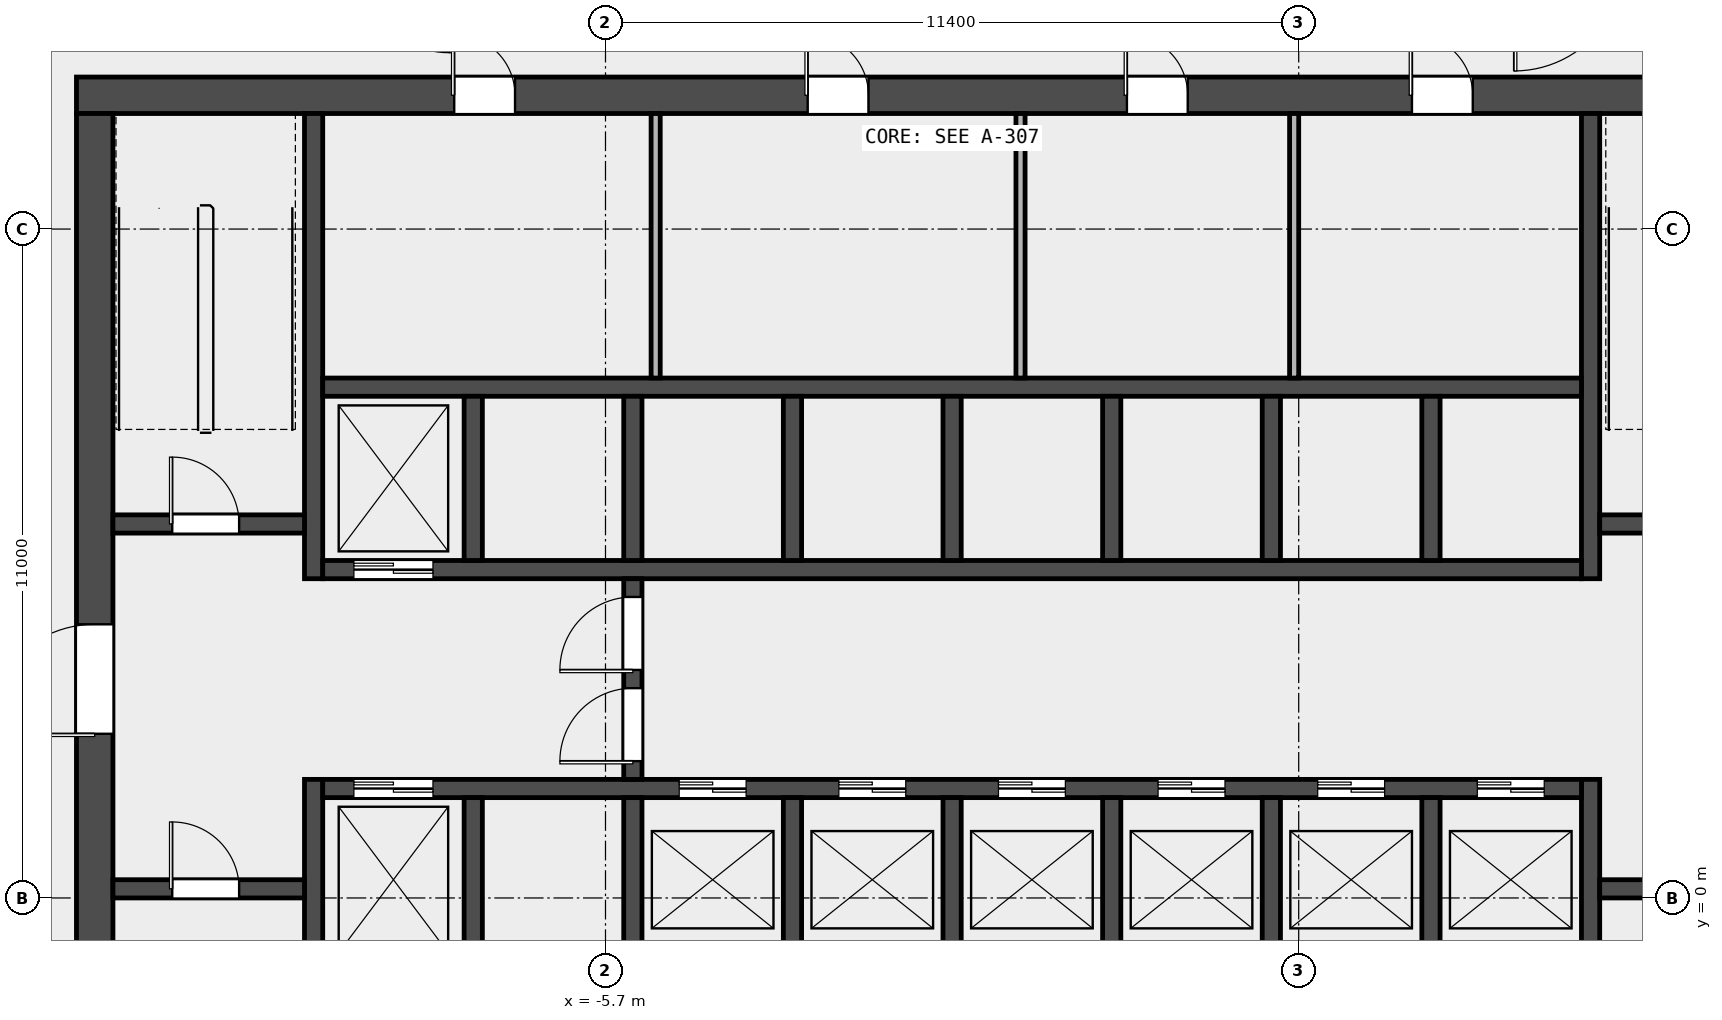
"""IFC4 building model, lengths in metres.
Left out: names, types, materials, properties, quantities, classifications, styles, units other than length and angle.
Written with IfcOpenShell. Run it as: python <this file> out.ifc"""

import sys

from ifc_helpers import new_model, si_unit, direction, frame, frame_2d, origin, place, context, subcontext, project, spatial, rectangle, extrude, element, fill, save


model = new_model("IFC4")
c1 = context("Model", 3, precision=1e-05, world=origin(), true_north=direction((0.0, 1.0)))
c2 = subcontext(c1, "Body", "Model", "MODEL_VIEW")
j1 = project(units=[si_unit("LENGTHUNIT", "METRE"), si_unit("PLANEANGLEUNIT", "RADIAN")], contexts=[c1])
p1 = place(None, origin())
s1 = spatial("IfcSite", under=j1, at=p1, CompositionType="ELEMENT")
p2 = place(p1, origin())
s2 = spatial("IfcBuilding", under=s1, at=p2, CompositionType="ELEMENT")
p3 = place(p2, frame((0.0, 0.0, 74.2)))
s3 = spatial("IfcBuildingStorey", under=s2, at=p3, CompositionType="ELEMENT", Elevation=74.2)
p4 = place(p3, frame((-14.4, 13.2, 0.0), z_axis=(0.0, 0.0, 1.0), x_axis=(1.0, 0.0, 0.0)))
e1 = element("IfcWall", 1, at=p4, inside=s3, PredefinedType="SHEAR", context=c2, shape_type="SweptSolid", body=[
    extrude(rectangle(XDim=28.8, YDim=0.6, at=frame_2d((14.4, 0.0))), origin(), (0.0, 0.0, 1.0), 4.5),
])
p5 = place(p4, frame((6.212, 0.0, 0.0)))
e2 = element("IfcOpeningElement", 2, at=p5, cuts=e1, PredefinedType="OPENING", context=c2, shape_type="SweptSolid", body=[
    extrude(rectangle(XDim=1.0, YDim=2.1, at=frame_2d((0.5, 1.05))), frame((0.0, 0.312, 0.0), z_axis=(0.0, -1.0, 0.0), x_axis=(1.0, 0.0, 0.0)), (0.0, 0.0, 1.0), 0.624),
])
p6 = place(p4, frame((12.025, 0.0, 0.0)))
e3 = element("IfcOpeningElement", 3, at=p6, cuts=e1, PredefinedType="OPENING", context=c2, shape_type="SweptSolid", body=[
    extrude(rectangle(XDim=1.0, YDim=2.1, at=frame_2d((0.5, 1.05))), frame((0.0, 0.312, 0.0), z_axis=(0.0, -1.0, 0.0), x_axis=(1.0, 0.0, 0.0)), (0.0, 0.0, 1.0), 0.624),
])
p7 = place(p4, frame((17.275, 0.0, 0.0)))
e4 = element("IfcOpeningElement", 4, at=p7, cuts=e1, PredefinedType="OPENING", context=c2, shape_type="SweptSolid", body=[
    extrude(rectangle(XDim=1.0, YDim=2.1, at=frame_2d((0.5, 1.05))), frame((0.0, 0.312, 0.0), z_axis=(0.0, -1.0, 0.0), x_axis=(1.0, 0.0, 0.0)), (0.0, 0.0, 1.0), 0.624),
])
p8 = place(p4, frame((21.962, 0.0, 0.0)))
e5 = element("IfcOpeningElement", 5, at=p8, cuts=e1, PredefinedType="OPENING", context=c2, shape_type="SweptSolid", body=[
    extrude(rectangle(XDim=1.0, YDim=2.1, at=frame_2d((0.5, 1.05))), frame((0.0, 0.312, 0.0), z_axis=(0.0, -1.0, 0.0), x_axis=(1.0, 0.0, 0.0)), (0.0, 0.0, 1.0), 0.624),
])
p9 = place(p3, frame((-14.1, -6.6, 0.0), z_axis=(0.0, 0.0, 1.0), x_axis=(0.0, 1.0, 0.0)))
e6 = element("IfcWall", 6, at=p9, inside=s3, PredefinedType="SHEAR", context=c2, shape_type="SweptSolid", body=[
    extrude(rectangle(XDim=19.5, YDim=0.6, at=frame_2d((9.75, 0.0))), origin(), (0.0, 0.0, 1.0), 4.5),
])
p10 = place(p9, frame((9.3, 0.0, 0.0)))
e7 = element("IfcOpeningElement", 7, at=p10, cuts=e6, PredefinedType="OPENING", context=c2, shape_type="SweptSolid", body=[
    extrude(rectangle(XDim=1.8, YDim=2.1, at=frame_2d((0.9, 1.05))), frame((0.0, 0.312, 0.0), z_axis=(0.0, -1.0, 0.0), x_axis=(1.0, 0.0, 0.0)), (0.0, 0.0, 1.0), 0.624),
])
p11 = place(p3, frame((-10.5, -6.6, 0.0), z_axis=(0.0, 0.0, 1.0), x_axis=(0.0, 1.0, 0.0)))
e8 = element("IfcWall", 8, at=p11, inside=s3, PredefinedType="SHEAR", context=c2, shape_type="SweptSolid", body=[
    extrude(rectangle(XDim=8.55, YDim=0.3, at=frame_2d((4.275, 0.0))), origin(), (0.0, 0.0, 1.0), 4.5),
])
p12 = place(p3, frame((-10.5, 5.25, 0.0), z_axis=(0.0, 0.0, 1.0), x_axis=(0.0, 1.0, 0.0)))
e9 = element("IfcWall", 9, at=p12, inside=s3, PredefinedType="SHEAR", context=c2, shape_type="SweptSolid", body=[
    extrude(rectangle(XDim=7.65, YDim=0.3, at=frame_2d((3.825, 0.0))), origin(), (0.0, 0.0, 1.0), 4.5),
])
p13 = place(p3, frame((10.5, -6.6, 0.0), z_axis=(0.0, 0.0, 1.0), x_axis=(0.0, 1.0, 0.0)))
e10 = element("IfcWall", 10, at=p13, inside=s3, PredefinedType="SHEAR", context=c2, shape_type="SweptSolid", body=[
    extrude(rectangle(XDim=8.55, YDim=0.3, at=frame_2d((4.275, 0.0))), origin(), (0.0, 0.0, 1.0), 4.5),
])
p14 = place(p3, frame((10.5, 5.25, 0.0), z_axis=(0.0, 0.0, 1.0), x_axis=(0.0, 1.0, 0.0)))
e11 = element("IfcWall", 11, at=p14, inside=s3, PredefinedType="SHEAR", context=c2, shape_type="SweptSolid", body=[
    extrude(rectangle(XDim=7.65, YDim=0.3, at=frame_2d((3.825, 0.0))), origin(), (0.0, 0.0, 1.0), 4.5),
])
p15 = place(p3, frame((-13.8, 0.15, 0.0), z_axis=(0.0, 0.0, 1.0), x_axis=(1.0, 0.0, 0.0)))
e12 = element("IfcWall", 12, at=p15, inside=s3, PredefinedType="SOLIDWALL", context=c2, shape_type="SweptSolid", body=[
    extrude(rectangle(XDim=3.15, YDim=0.3, at=frame_2d((1.575, 0.0))), origin(), (0.0, 0.0, 1.0), 4.5),
])
p16 = place(p15, frame((0.975, 0.0, 0.0)))
e13 = element("IfcOpeningElement", 13, at=p16, cuts=e12, PredefinedType="OPENING", context=c2, shape_type="SweptSolid", body=[
    extrude(rectangle(XDim=1.1, YDim=2.1, at=frame_2d((0.55, 1.05))), frame((0.0, 0.162, 0.0), z_axis=(0.0, -1.0, 0.0), x_axis=(1.0, 0.0, 0.0)), (0.0, 0.0, 1.0), 0.324),
])
p17 = place(p3, frame((-13.8, 6.15, 0.0), z_axis=(0.0, 0.0, 1.0), x_axis=(1.0, 0.0, 0.0)))
e14 = element("IfcWall", 14, at=p17, inside=s3, PredefinedType="SOLIDWALL", context=c2, shape_type="SweptSolid", body=[
    extrude(rectangle(XDim=3.15, YDim=0.3, at=frame_2d((1.575, 0.0))), origin(), (0.0, 0.0, 1.0), 4.5),
])
p18 = place(p17, frame((0.975, 0.0, 0.0)))
e15 = element("IfcOpeningElement", 15, at=p18, cuts=e14, PredefinedType="OPENING", context=c2, shape_type="SweptSolid", body=[
    extrude(rectangle(XDim=1.1, YDim=2.1, at=frame_2d((0.55, 1.05))), frame((0.0, 0.162, 0.0), z_axis=(0.0, -1.0, 0.0), x_axis=(1.0, 0.0, 0.0)), (0.0, 0.0, 1.0), 0.324),
])
p19 = place(p3, frame((10.65, 0.15, 0.0), z_axis=(0.0, 0.0, 1.0), x_axis=(1.0, 0.0, 0.0)))
e16 = element("IfcWall", 16, at=p19, inside=s3, PredefinedType="SOLIDWALL", context=c2, shape_type="SweptSolid", body=[
    extrude(rectangle(XDim=3.15, YDim=0.3, at=frame_2d((1.575, 0.0))), origin(), (0.0, 0.0, 1.0), 4.5),
])
p20 = place(p19, frame((1.025, 0.0, 0.0)))
e17 = element("IfcOpeningElement", 17, at=p20, cuts=e16, PredefinedType="OPENING", context=c2, shape_type="SweptSolid", body=[
    extrude(rectangle(XDim=1.1, YDim=2.1, at=frame_2d((0.55, 1.05))), frame((0.0, 0.162, 0.0), z_axis=(0.0, -1.0, 0.0), x_axis=(1.0, 0.0, 0.0)), (0.0, 0.0, 1.0), 0.324),
])
p21 = place(p3, frame((10.65, 6.15, 0.0), z_axis=(0.0, 0.0, 1.0), x_axis=(1.0, 0.0, 0.0)))
e18 = element("IfcWall", 18, at=p21, inside=s3, PredefinedType="SOLIDWALL", context=c2, shape_type="SweptSolid", body=[
    extrude(rectangle(XDim=3.15, YDim=0.3, at=frame_2d((1.575, 0.0))), origin(), (0.0, 0.0, 1.0), 4.5),
])
p22 = place(p21, frame((1.025, 0.0, 0.0)))
e19 = element("IfcOpeningElement", 19, at=p22, cuts=e18, PredefinedType="OPENING", context=c2, shape_type="SweptSolid", body=[
    extrude(rectangle(XDim=1.1, YDim=2.1, at=frame_2d((0.55, 1.05))), frame((0.0, 0.162, 0.0), z_axis=(0.0, -1.0, 0.0), x_axis=(1.0, 0.0, 0.0)), (0.0, 0.0, 1.0), 0.324),
])
p23 = place(p3, frame((-10.35, 1.8, 0.0), z_axis=(0.0, 0.0, 1.0), x_axis=(1.0, 0.0, 0.0)))
e20 = element("IfcWall", 20, at=p23, inside=s3, PredefinedType="SOLIDWALL", context=c2, shape_type="SweptSolid", body=[
    extrude(rectangle(XDim=20.7, YDim=0.3, at=frame_2d((10.35, 0.0))), origin(), (0.0, 0.0, 1.0), 4.5),
])
p24 = place(p23, frame((0.512, 0.0, 0.0)))
e21 = element("IfcOpeningElement", 21, at=p24, cuts=e20, PredefinedType="OPENING", context=c2, shape_type="SweptSolid", body=[
    extrude(rectangle(XDim=1.3, YDim=2.1, at=frame_2d((0.65, 1.05))), frame((0.0, 0.162, 0.0), z_axis=(0.0, -1.0, 0.0), x_axis=(1.0, 0.0, 0.0)), (0.0, 0.0, 1.0), 0.324),
])
p25 = place(p23, frame((5.863, 0.0, 0.0)))
e22 = element("IfcOpeningElement", 22, at=p25, cuts=e20, PredefinedType="OPENING", context=c2, shape_type="SweptSolid", body=[
    extrude(rectangle(XDim=1.1, YDim=2.1, at=frame_2d((0.55, 1.05))), frame((0.0, 0.162, 0.0), z_axis=(0.0, -1.0, 0.0), x_axis=(1.0, 0.0, 0.0)), (0.0, 0.0, 1.0), 0.324),
])
p26 = place(p23, frame((8.488, 0.0, 0.0)))
e23 = element("IfcOpeningElement", 23, at=p26, cuts=e20, PredefinedType="OPENING", context=c2, shape_type="SweptSolid", body=[
    extrude(rectangle(XDim=1.1, YDim=2.1, at=frame_2d((0.55, 1.05))), frame((0.0, 0.162, 0.0), z_axis=(0.0, -1.0, 0.0), x_axis=(1.0, 0.0, 0.0)), (0.0, 0.0, 1.0), 0.324),
])
p27 = place(p23, frame((11.113, 0.0, 0.0)))
e24 = element("IfcOpeningElement", 24, at=p27, cuts=e20, PredefinedType="OPENING", context=c2, shape_type="SweptSolid", body=[
    extrude(rectangle(XDim=1.1, YDim=2.1, at=frame_2d((0.55, 1.05))), frame((0.0, 0.162, 0.0), z_axis=(0.0, -1.0, 0.0), x_axis=(1.0, 0.0, 0.0)), (0.0, 0.0, 1.0), 0.324),
])
p28 = place(p23, frame((13.738, 0.0, 0.0)))
e25 = element("IfcOpeningElement", 25, at=p28, cuts=e20, PredefinedType="OPENING", context=c2, shape_type="SweptSolid", body=[
    extrude(rectangle(XDim=1.1, YDim=2.1, at=frame_2d((0.55, 1.05))), frame((0.0, 0.162, 0.0), z_axis=(0.0, -1.0, 0.0), x_axis=(1.0, 0.0, 0.0)), (0.0, 0.0, 1.0), 0.324),
])
p29 = place(p23, frame((16.363, 0.0, 0.0)))
e26 = element("IfcOpeningElement", 26, at=p29, cuts=e20, PredefinedType="OPENING", context=c2, shape_type="SweptSolid", body=[
    extrude(rectangle(XDim=1.1, YDim=2.1, at=frame_2d((0.55, 1.05))), frame((0.0, 0.162, 0.0), z_axis=(0.0, -1.0, 0.0), x_axis=(1.0, 0.0, 0.0)), (0.0, 0.0, 1.0), 0.324),
])
p30 = place(p23, frame((18.988, 0.0, 0.0)))
e27 = element("IfcOpeningElement", 27, at=p30, cuts=e20, PredefinedType="OPENING", context=c2, shape_type="SweptSolid", body=[
    extrude(rectangle(XDim=1.1, YDim=2.1, at=frame_2d((0.55, 1.05))), frame((0.0, 0.162, 0.0), z_axis=(0.0, -1.0, 0.0), x_axis=(1.0, 0.0, 0.0)), (0.0, 0.0, 1.0), 0.324),
])
p31 = place(p3, frame((-10.35, 5.4, 0.0), z_axis=(0.0, 0.0, 1.0), x_axis=(1.0, 0.0, 0.0)))
e28 = element("IfcWall", 28, at=p31, inside=s3, PredefinedType="SOLIDWALL", context=c2, shape_type="SweptSolid", body=[
    extrude(rectangle(XDim=20.7, YDim=0.3, at=frame_2d((10.35, 0.0))), origin(), (0.0, 0.0, 1.0), 4.5),
])
p32 = place(p31, frame((0.512, 0.0, 0.0)))
e29 = element("IfcOpeningElement", 29, at=p32, cuts=e28, PredefinedType="OPENING", context=c2, shape_type="SweptSolid", body=[
    extrude(rectangle(XDim=1.3, YDim=2.1, at=frame_2d((0.65, 1.05))), frame((0.0, 0.162, 0.0), z_axis=(0.0, -1.0, 0.0), x_axis=(1.0, 0.0, 0.0)), (0.0, 0.0, 1.0), 0.324),
])
p33 = place(p3, frame((-10.35, 8.4, 0.0), z_axis=(0.0, 0.0, 1.0), x_axis=(1.0, 0.0, 0.0)))
e30 = element("IfcWall", 30, at=p33, inside=s3, PredefinedType="SOLIDWALL", context=c2, shape_type="SweptSolid", body=[
    extrude(rectangle(XDim=20.7, YDim=0.3, at=frame_2d((10.35, 0.0))), origin(), (0.0, 0.0, 1.0), 4.5),
])
for number, where, z_axis, x_axis in (
    (31, (-7.875, -1.05, 0.0), (0.0, 0.0, 1.0), (0.0, 1.0, 0.0)),
    (32, (-5.25, -1.05, 0.0), (0.0, 0.0, 1.0), (0.0, 1.0, 0.0)),
    (33, (-2.625, -1.05, 0.0), (0.0, 0.0, 1.0), (0.0, 1.0, 0.0)),
    (34, (0.0, -1.05, 0.0), (0.0, 0.0, 1.0), (0.0, 1.0, 0.0)),
    (35, (2.625, -1.05, 0.0), (0.0, 0.0, 1.0), (0.0, 1.0, 0.0)),
    (36, (5.25, -1.05, 0.0), (0.0, 0.0, 1.0), (0.0, 1.0, 0.0)),
    (37, (7.875, -1.05, 0.0), (0.0, 0.0, 1.0), (0.0, 1.0, 0.0)),
    (38, (-7.875, 5.55, 0.0), (0.0, 0.0, 1.0), (0.0, 1.0, 0.0)),
    (39, (-5.25, 5.55, 0.0), (0.0, 0.0, 1.0), (0.0, 1.0, 0.0)),
    (40, (-2.625, 5.55, 0.0), (0.0, 0.0, 1.0), (0.0, 1.0, 0.0)),
    (41, (0.0, 5.55, 0.0), (0.0, 0.0, 1.0), (0.0, 1.0, 0.0)),
    (42, (2.625, 5.55, 0.0), (0.0, 0.0, 1.0), (0.0, 1.0, 0.0)),
    (43, (5.25, 5.55, 0.0), (0.0, 0.0, 1.0), (0.0, 1.0, 0.0)),
    (44, (7.875, 5.55, 0.0), (0.0, 0.0, 1.0), (0.0, 1.0, 0.0)),
):
    element("IfcWall", number, at=place(p3, frame(where, z_axis=z_axis, x_axis=x_axis)), inside=s3, PredefinedType="SOLIDWALL", context=c2, shape_type="SweptSolid", body=[
        extrude(rectangle(XDim=2.7, YDim=0.3, at=frame_2d((1.35, 0.0))), origin(), (0.0, 0.0, 1.0), 4.5),
    ])
p34 = place(p3, frame((-5.25, 1.95, 0.0), z_axis=(0.0, 0.0, 1.0), x_axis=(0.0, 1.0, 0.0)))
e45 = element("IfcWall", 45, at=p34, inside=s3, PredefinedType="SOLIDWALL", context=c2, shape_type="SweptSolid", body=[
    extrude(rectangle(XDim=3.3, YDim=0.3, at=frame_2d((1.65, 0.0))), origin(), (0.0, 0.0, 1.0), 4.5),
])
p35 = place(p34, frame((0.3, 0.0, 0.0)))
e46 = element("IfcOpeningElement", 46, at=p35, cuts=e45, PredefinedType="OPENING", context=c2, shape_type="SweptSolid", body=[
    extrude(rectangle(XDim=1.2, YDim=2.1, at=frame_2d((0.6, 1.05))), frame((0.0, 0.162, 0.0), z_axis=(0.0, -1.0, 0.0), x_axis=(1.0, 0.0, 0.0)), (0.0, 0.0, 1.0), 0.324),
])
p36 = place(p34, frame((1.8, 0.0, 0.0)))
e47 = element("IfcOpeningElement", 47, at=p36, cuts=e45, PredefinedType="OPENING", context=c2, shape_type="SweptSolid", body=[
    extrude(rectangle(XDim=1.2, YDim=2.1, at=frame_2d((0.6, 1.05))), frame((0.0, 0.162, 0.0), z_axis=(0.0, -1.0, 0.0), x_axis=(1.0, 0.0, 0.0)), (0.0, 0.0, 1.0), 0.324),
])
for number, where, z_axis, x_axis in (
    (48, (-4.875, 8.55, 0.0), (0.0, 0.0, 1.0), (0.0, 1.0, 0.0)),
    (49, (1.125, 8.55, 0.0), (0.0, 0.0, 1.0), (0.0, 1.0, 0.0)),
    (50, (5.625, 8.55, 0.0), (0.0, 0.0, 1.0), (0.0, 1.0, 0.0)),
):
    element("IfcWall", number, at=place(p3, frame(where, z_axis=z_axis, x_axis=x_axis)), inside=s3, PredefinedType="PARTITIONING", context=c2, shape_type="SweptSolid", body=[
        extrude(rectangle(XDim=4.35, YDim=0.15, at=frame_2d((2.175, 0.0))), origin(), (0.0, 0.0, 1.0), 4.5),
    ])
p37 = place(p16, origin())
e51 = element("IfcDoor", 51, at=p37, inside=s3, OperationType="SINGLE_SWING_LEFT", PredefinedType="DOOR", context=c2, shape_type="SweptSolid", body=[
    extrude(rectangle(XDim=1.1, YDim=2.1, at=frame_2d((0.55, 1.05))), frame((0.0, 0.025, 0.0), z_axis=(0.0, -1.0, 0.0), x_axis=(1.0, 0.0, 0.0)), (0.0, 0.0, 1.0), 0.05),
])
fill(e13, e51)
p38 = place(p18, origin())
e52 = element("IfcDoor", 52, at=p38, inside=s3, OperationType="SINGLE_SWING_LEFT", PredefinedType="DOOR", context=c2, shape_type="SweptSolid", body=[
    extrude(rectangle(XDim=1.1, YDim=2.1, at=frame_2d((0.55, 1.05))), frame((0.0, 0.025, 0.0), z_axis=(0.0, -1.0, 0.0), x_axis=(1.0, 0.0, 0.0)), (0.0, 0.0, 1.0), 0.05),
])
fill(e15, e52)
p39 = place(p10, origin())
e53 = element("IfcDoor", 53, at=p39, inside=s3, OperationType="DOUBLE_DOOR_SINGLE_SWING", PredefinedType="DOOR", context=c2, shape_type="SweptSolid", body=[
    extrude(rectangle(XDim=1.8, YDim=2.1, at=frame_2d((0.9, 1.05))), frame((0.0, 0.025, 0.0), z_axis=(0.0, -1.0, 0.0), x_axis=(1.0, 0.0, 0.0)), (0.0, 0.0, 1.0), 0.05),
])
fill(e7, e53)
p40 = place(p35, origin())
e54 = element("IfcDoor", 54, at=p40, inside=s3, OperationType="SINGLE_SWING_LEFT", PredefinedType="DOOR", context=c2, shape_type="SweptSolid", body=[
    extrude(rectangle(XDim=1.2, YDim=2.1, at=frame_2d((0.6, 1.05))), frame((0.0, 0.025, 0.0), z_axis=(0.0, -1.0, 0.0), x_axis=(1.0, 0.0, 0.0)), (0.0, 0.0, 1.0), 0.05),
])
fill(e46, e54)
p41 = place(p36, origin())
e55 = element("IfcDoor", 55, at=p41, inside=s3, OperationType="SINGLE_SWING_RIGHT", PredefinedType="DOOR", context=c2, shape_type="SweptSolid", body=[
    extrude(rectangle(XDim=1.2, YDim=2.1, at=frame_2d((0.6, 1.05))), frame((0.0, 0.025, 0.0), z_axis=(0.0, -1.0, 0.0), x_axis=(1.0, 0.0, 0.0)), (0.0, 0.0, 1.0), 0.05),
])
fill(e47, e55)
p42 = place(p24, origin())
e56 = element("IfcDoor", 56, at=p42, inside=s3, OperationType="DOUBLE_DOOR_SLIDING", PredefinedType="DOOR", context=c2, shape_type="SweptSolid", body=[
    extrude(rectangle(XDim=1.3, YDim=2.1, at=frame_2d((0.65, 1.05))), frame((0.0, 0.025, 0.0), z_axis=(0.0, -1.0, 0.0), x_axis=(1.0, 0.0, 0.0)), (0.0, 0.0, 1.0), 0.05),
])
fill(e21, e56)
p43 = place(p25, origin())
e57 = element("IfcDoor", 57, at=p43, inside=s3, OperationType="DOUBLE_DOOR_SLIDING", PredefinedType="DOOR", context=c2, shape_type="SweptSolid", body=[
    extrude(rectangle(XDim=1.1, YDim=2.1, at=frame_2d((0.55, 1.05))), frame((0.0, 0.025, 0.0), z_axis=(0.0, -1.0, 0.0), x_axis=(1.0, 0.0, 0.0)), (0.0, 0.0, 1.0), 0.05),
])
fill(e22, e57)
p44 = place(p26, origin())
e58 = element("IfcDoor", 58, at=p44, inside=s3, OperationType="DOUBLE_DOOR_SLIDING", PredefinedType="DOOR", context=c2, shape_type="SweptSolid", body=[
    extrude(rectangle(XDim=1.1, YDim=2.1, at=frame_2d((0.55, 1.05))), frame((0.0, 0.025, 0.0), z_axis=(0.0, -1.0, 0.0), x_axis=(1.0, 0.0, 0.0)), (0.0, 0.0, 1.0), 0.05),
])
fill(e23, e58)
p45 = place(p27, origin())
e59 = element("IfcDoor", 59, at=p45, inside=s3, OperationType="DOUBLE_DOOR_SLIDING", PredefinedType="DOOR", context=c2, shape_type="SweptSolid", body=[
    extrude(rectangle(XDim=1.1, YDim=2.1, at=frame_2d((0.55, 1.05))), frame((0.0, 0.025, 0.0), z_axis=(0.0, -1.0, 0.0), x_axis=(1.0, 0.0, 0.0)), (0.0, 0.0, 1.0), 0.05),
])
fill(e24, e59)
p46 = place(p28, origin())
e60 = element("IfcDoor", 60, at=p46, inside=s3, OperationType="DOUBLE_DOOR_SLIDING", PredefinedType="DOOR", context=c2, shape_type="SweptSolid", body=[
    extrude(rectangle(XDim=1.1, YDim=2.1, at=frame_2d((0.55, 1.05))), frame((0.0, 0.025, 0.0), z_axis=(0.0, -1.0, 0.0), x_axis=(1.0, 0.0, 0.0)), (0.0, 0.0, 1.0), 0.05),
])
fill(e25, e60)
p47 = place(p29, origin())
e61 = element("IfcDoor", 61, at=p47, inside=s3, OperationType="DOUBLE_DOOR_SLIDING", PredefinedType="DOOR", context=c2, shape_type="SweptSolid", body=[
    extrude(rectangle(XDim=1.1, YDim=2.1, at=frame_2d((0.55, 1.05))), frame((0.0, 0.025, 0.0), z_axis=(0.0, -1.0, 0.0), x_axis=(1.0, 0.0, 0.0)), (0.0, 0.0, 1.0), 0.05),
])
fill(e26, e61)
p48 = place(p30, origin())
e62 = element("IfcDoor", 62, at=p48, inside=s3, OperationType="DOUBLE_DOOR_SLIDING", PredefinedType="DOOR", context=c2, shape_type="SweptSolid", body=[
    extrude(rectangle(XDim=1.1, YDim=2.1, at=frame_2d((0.55, 1.05))), frame((0.0, 0.025, 0.0), z_axis=(0.0, -1.0, 0.0), x_axis=(1.0, 0.0, 0.0)), (0.0, 0.0, 1.0), 0.05),
])
fill(e27, e62)
p49 = place(p32, origin())
e63 = element("IfcDoor", 63, at=p49, inside=s3, OperationType="DOUBLE_DOOR_SLIDING", PredefinedType="DOOR", context=c2, shape_type="SweptSolid", body=[
    extrude(rectangle(XDim=1.3, YDim=2.1, at=frame_2d((0.65, 1.05))), frame((0.0, 0.025, 0.0), z_axis=(0.0, -1.0, 0.0), x_axis=(1.0, 0.0, 0.0)), (0.0, 0.0, 1.0), 0.05),
])
fill(e29, e63)
p50 = place(p5, origin())
e64 = element("IfcDoor", 64, at=p50, inside=s3, OperationType="SINGLE_SWING_LEFT", PredefinedType="DOOR", context=c2, shape_type="SweptSolid", body=[
    extrude(rectangle(XDim=1.0, YDim=2.1, at=frame_2d((0.5, 1.05))), frame((0.0, 0.025, 0.0), z_axis=(0.0, -1.0, 0.0), x_axis=(1.0, 0.0, 0.0)), (0.0, 0.0, 1.0), 0.05),
])
fill(e2, e64)
p51 = place(p6, origin())
e65 = element("IfcDoor", 65, at=p51, inside=s3, OperationType="SINGLE_SWING_LEFT", PredefinedType="DOOR", context=c2, shape_type="SweptSolid", body=[
    extrude(rectangle(XDim=1.0, YDim=2.1, at=frame_2d((0.5, 1.05))), frame((0.0, 0.025, 0.0), z_axis=(0.0, -1.0, 0.0), x_axis=(1.0, 0.0, 0.0)), (0.0, 0.0, 1.0), 0.05),
])
fill(e3, e65)
p52 = place(p7, origin())
e66 = element("IfcDoor", 66, at=p52, inside=s3, OperationType="SINGLE_SWING_LEFT", PredefinedType="DOOR", context=c2, shape_type="SweptSolid", body=[
    extrude(rectangle(XDim=1.0, YDim=2.1, at=frame_2d((0.5, 1.05))), frame((0.0, 0.025, 0.0), z_axis=(0.0, -1.0, 0.0), x_axis=(1.0, 0.0, 0.0)), (0.0, 0.0, 1.0), 0.05),
])
fill(e4, e66)
p53 = place(p8, origin())
e67 = element("IfcDoor", 67, at=p53, inside=s3, OperationType="SINGLE_SWING_LEFT", PredefinedType="DOOR", context=c2, shape_type="SweptSolid", body=[
    extrude(rectangle(XDim=1.0, YDim=2.1, at=frame_2d((0.5, 1.05))), frame((0.0, 0.025, 0.0), z_axis=(0.0, -1.0, 0.0), x_axis=(1.0, 0.0, 0.0)), (0.0, 0.0, 1.0), 0.05),
])
fill(e5, e67)
save(model, sys.argv[1])
